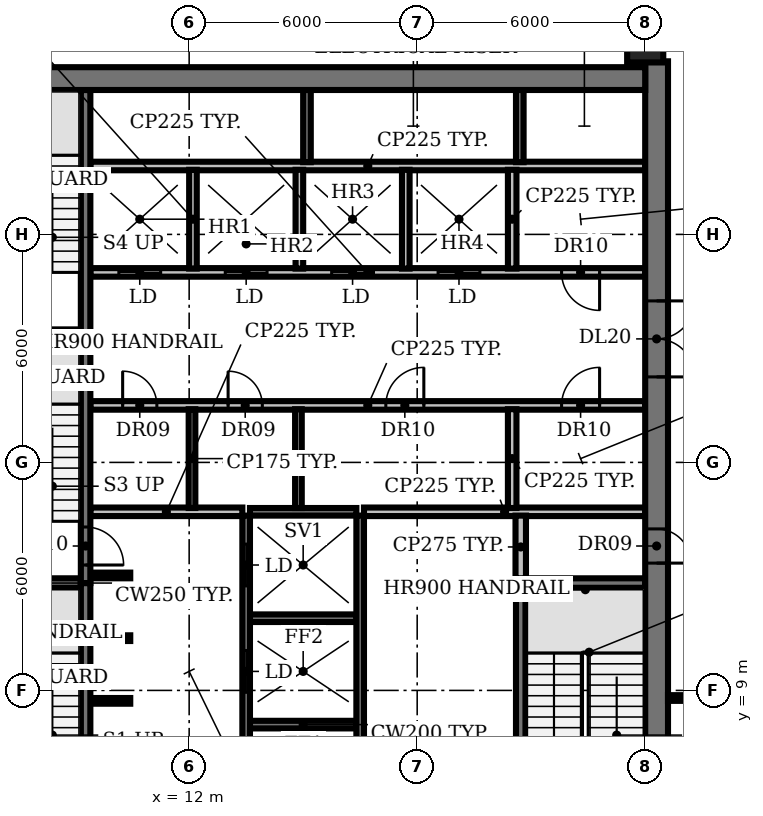
"""IFC4 building model, lengths in metres.
Left out: names, types, materials, properties, quantities, classifications, styles, units other than length and angle.
Written with IfcOpenShell. Run it as: python <this file> out.ifc"""

import sys

from ifc_helpers import new_model, si_unit, direction, frame, frame_2d, origin, origin_2d, place, context, subcontext, project, spatial, rectangle, circle, extrude, element, fill, save


model = new_model("IFC4")
c1 = context("Model", 3, precision=1e-05, world=origin(), true_north=direction((0.0, 1.0)))
c2 = subcontext(c1, "Body", "Model", "MODEL_VIEW")
j1 = project(units=[si_unit("LENGTHUNIT", "METRE"), si_unit("PLANEANGLEUNIT", "RADIAN")], contexts=[c1])
p1 = place(None, origin())
s1 = spatial("IfcSite", under=j1, at=p1, CompositionType="ELEMENT")
p2 = place(p1, origin())
s2 = spatial("IfcBuilding", under=s1, at=p2, CompositionType="ELEMENT")
p3 = place(p2, frame((0.0, 0.0, 155.0)))
s3 = spatial("IfcBuildingStorey", under=s2, at=p3, CompositionType="ELEMENT", Elevation=155.0)
p4 = place(p3, frame((24.0, 26.0, 0.0), z_axis=(0.0, 0.0, 1.0), x_axis=(1.0, 0.0, 0.0)))
e1 = element("IfcColumn", 1, at=p4, inside=s3, PredefinedType="COLUMN", context=c2, shape_type="SweptSolid", body=[
    extrude(circle(Radius=0.475, at=origin_2d()), origin(), (0.0, 0.0, 1.0), 3.85),
])
p5 = place(p3, frame((13.6, 8.1, 0.0), z_axis=(0.0, 0.0, 1.0), x_axis=(1.0, 0.0, 0.0)))
e2 = element("IfcWall", 2, at=p5, inside=s3, PredefinedType="SHEAR", context=c2, shape_type="SweptSolid", body=[
    extrude(rectangle(XDim=2.8, YDim=0.2, at=frame_2d((1.4, 0.0))), origin(), (0.0, 0.0, 1.0), 3.85),
])
for number, where, z_axis, x_axis in (
    (3, (9.4, 8.725, 0.0), (0.0, 0.0, 1.0), (1.0, 0.0, 0.0)),
    (4, (9.4, 10.375, 0.0), (0.0, 0.0, 1.0), (1.0, 0.0, 0.0)),
):
    element("IfcWall", number, at=place(p3, frame(where, z_axis=z_axis, x_axis=x_axis)), inside=s3, PredefinedType="SHEAR", context=c2, shape_type="SweptSolid", body=[
        extrude(rectangle(XDim=1.05, YDim=0.15, at=frame_2d((0.525, 0.0))), origin(), (0.0, 0.0, 1.0), 3.85),
    ])
p6 = place(p3, frame((13.6, 10.9, 0.0), z_axis=(0.0, 0.0, 1.0), x_axis=(1.0, 0.0, 0.0)))
e5 = element("IfcWall", 5, at=p6, inside=s3, PredefinedType="SHEAR", context=c2, shape_type="SweptSolid", body=[
    extrude(rectangle(XDim=2.8, YDim=0.2, at=frame_2d((1.4, 0.0))), origin(), (0.0, 0.0, 1.0), 3.85),
])
for number, where, z_axis, x_axis in (
    (6, (6.0, 11.825, 0.0), (0.0, 0.0, 1.0), (1.0, 0.0, 0.0)),
    (7, (20.85, 11.825, 0.0), (0.0, 0.0, 1.0), (1.0, 0.0, 0.0)),
):
    element("IfcWall", number, at=place(p3, frame(where, z_axis=z_axis, x_axis=x_axis)), inside=s3, PredefinedType="SHEAR", context=c2, shape_type="SweptSolid", body=[
        extrude(rectangle(XDim=3.15, YDim=0.25, at=frame_2d((1.575, 0.0))), origin(), (0.0, 0.0, 1.0), 3.85),
    ])
p7 = place(p3, frame((9.4, 12.025, 0.0), z_axis=(0.0, 0.0, 1.0), x_axis=(1.0, 0.0, 0.0)))
e8 = element("IfcWall", 8, at=p7, inside=s3, PredefinedType="SHEAR", context=c2, shape_type="SweptSolid", body=[
    extrude(rectangle(XDim=1.05, YDim=0.15, at=frame_2d((0.525, 0.0))), origin(), (0.0, 0.0, 1.0), 3.85),
])
p8 = place(p3, frame((9.4, 13.7, 0.0), z_axis=(0.0, 0.0, 1.0), x_axis=(1.0, 0.0, 0.0)))
e9 = element("IfcWall", 9, at=p8, inside=s3, PredefinedType="PARTITIONING", context=c2, shape_type="SweptSolid", body=[
    extrude(rectangle(XDim=4.0, YDim=0.225, at=frame_2d((2.0, 0.0))), origin(), (0.0, 0.0, 1.0), 3.85),
])
p9 = place(p3, frame((13.6, 13.7, 0.0), z_axis=(0.0, 0.0, 1.0), x_axis=(1.0, 0.0, 0.0)))
e10 = element("IfcWall", 10, at=p9, inside=s3, PredefinedType="SHEAR", context=c2, shape_type="SweptSolid", body=[
    extrude(rectangle(XDim=2.8, YDim=0.2, at=frame_2d((1.4, 0.0))), origin(), (0.0, 0.0, 1.0), 3.85),
])
p10 = place(p3, frame((16.6, 13.7, 0.0), z_axis=(0.0, 0.0, 1.0), x_axis=(1.0, 0.0, 0.0)))
e11 = element("IfcWall", 11, at=p10, inside=s3, PredefinedType="PARTITIONING", context=c2, shape_type="SweptSolid", body=[
    extrude(rectangle(XDim=7.4, YDim=0.225, at=frame_2d((3.7, 0.0))), origin(), (0.0, 0.0, 1.0), 3.85),
])
p11 = place(p3, frame((9.4, 16.5, 0.0), z_axis=(0.0, 0.0, 1.0), x_axis=(1.0, 0.0, 0.0)))
e12 = element("IfcWall", 12, at=p11, inside=s3, PredefinedType="PARTITIONING", context=c2, shape_type="SweptSolid", body=[
    extrude(rectangle(XDim=14.6, YDim=0.225, at=frame_2d((7.3, 0.0))), origin(), (0.0, 0.0, 1.0), 3.85),
])
p12 = place(p11, frame((0.85, 0.0, 0.0)))
e13 = element("IfcOpeningElement", 13, at=p12, cuts=e12, PredefinedType="OPENING", context=c2, shape_type="SweptSolid", body=[
    extrude(rectangle(XDim=0.9, YDim=2.1, at=frame_2d((0.45, 1.05))), frame((0.0, 0.123, 0.0), z_axis=(0.0, -1.0, 0.0), x_axis=(1.0, 0.0, 0.0)), (0.0, 0.0, 1.0), 0.245),
])
p13 = place(p11, frame((3.625, 0.0, 0.0)))
e14 = element("IfcOpeningElement", 14, at=p13, cuts=e12, PredefinedType="OPENING", context=c2, shape_type="SweptSolid", body=[
    extrude(rectangle(XDim=0.9, YDim=2.1, at=frame_2d((0.45, 1.05))), frame((0.0, 0.123, 0.0), z_axis=(0.0, -1.0, 0.0), x_axis=(1.0, 0.0, 0.0)), (0.0, 0.0, 1.0), 0.245),
])
p14 = place(p11, frame((7.775, 0.0, 0.0)))
e15 = element("IfcOpeningElement", 15, at=p14, cuts=e12, PredefinedType="OPENING", context=c2, shape_type="SweptSolid", body=[
    extrude(rectangle(XDim=1.0, YDim=2.1, at=frame_2d((0.5, 1.05))), frame((0.0, 0.123, 0.0), z_axis=(0.0, -1.0, 0.0), x_axis=(1.0, 0.0, 0.0)), (0.0, 0.0, 1.0), 0.245),
])
p15 = place(p11, frame((12.4, 0.0, 0.0)))
e16 = element("IfcOpeningElement", 16, at=p15, cuts=e12, PredefinedType="OPENING", context=c2, shape_type="SweptSolid", body=[
    extrude(rectangle(XDim=1.0, YDim=2.1, at=frame_2d((0.5, 1.05))), frame((0.0, 0.123, 0.0), z_axis=(0.0, -1.0, 0.0), x_axis=(1.0, 0.0, 0.0)), (0.0, 0.0, 1.0), 0.245),
])
p16 = place(p3, frame((6.0, 18.375, 0.0), z_axis=(0.0, 0.0, 1.0), x_axis=(1.0, 0.0, 0.0)))
e17 = element("IfcWall", 17, at=p16, inside=s3, PredefinedType="SHEAR", context=c2, shape_type="SweptSolid", body=[
    extrude(rectangle(XDim=3.15, YDim=0.25, at=frame_2d((1.575, 0.0))), origin(), (0.0, 0.0, 1.0), 3.85),
])
p17 = place(p3, frame((24.0, 20.0, 0.0), z_axis=(0.0, 0.0, 1.0), x_axis=(-1.0, 0.0, 0.0)))
e18 = element("IfcWall", 18, at=p17, inside=s3, PredefinedType="PARTITIONING", context=c2, shape_type="SweptSolid", body=[
    extrude(rectangle(XDim=14.6, YDim=0.225, at=frame_2d((7.3, 0.0))), origin(), (0.0, 0.0, 1.0), 3.85),
])
p18 = place(p17, frame((12.75, 0.0, 0.0)))
e19 = element("IfcOpeningElement", 19, at=p18, cuts=e18, PredefinedType="OPENING", context=c2, shape_type="SweptSolid", body=[
    extrude(rectangle(XDim=1.1, YDim=2.1, at=frame_2d((0.55, 1.05))), frame((0.0, 0.123, 0.0), z_axis=(0.0, -1.0, 0.0), x_axis=(1.0, 0.0, 0.0)), (0.0, 0.0, 1.0), 0.245),
])
p19 = place(p17, frame((9.95, 0.0, 0.0)))
e20 = element("IfcOpeningElement", 20, at=p19, cuts=e18, PredefinedType="OPENING", context=c2, shape_type="SweptSolid", body=[
    extrude(rectangle(XDim=1.1, YDim=2.1, at=frame_2d((0.55, 1.05))), frame((0.0, 0.123, 0.0), z_axis=(0.0, -1.0, 0.0), x_axis=(1.0, 0.0, 0.0)), (0.0, 0.0, 1.0), 0.245),
])
p20 = place(p17, frame((7.15, 0.0, 0.0)))
e21 = element("IfcOpeningElement", 21, at=p20, cuts=e18, PredefinedType="OPENING", context=c2, shape_type="SweptSolid", body=[
    extrude(rectangle(XDim=1.1, YDim=2.1, at=frame_2d((0.55, 1.05))), frame((0.0, 0.123, 0.0), z_axis=(0.0, -1.0, 0.0), x_axis=(1.0, 0.0, 0.0)), (0.0, 0.0, 1.0), 0.245),
])
p21 = place(p17, frame((4.35, 0.0, 0.0)))
e22 = element("IfcOpeningElement", 22, at=p21, cuts=e18, PredefinedType="OPENING", context=c2, shape_type="SweptSolid", body=[
    extrude(rectangle(XDim=1.1, YDim=2.1, at=frame_2d((0.55, 1.05))), frame((0.0, 0.123, 0.0), z_axis=(0.0, -1.0, 0.0), x_axis=(1.0, 0.0, 0.0)), (0.0, 0.0, 1.0), 0.245),
])
p22 = place(p17, frame((1.2, 0.0, 0.0)))
e23 = element("IfcOpeningElement", 23, at=p22, cuts=e18, PredefinedType="OPENING", context=c2, shape_type="SweptSolid", body=[
    extrude(rectangle(XDim=1.0, YDim=2.1, at=frame_2d((0.5, 1.05))), frame((0.0, 0.123, 0.0), z_axis=(0.0, -1.0, 0.0), x_axis=(1.0, 0.0, 0.0)), (0.0, 0.0, 1.0), 0.245),
])
p23 = place(p3, frame((9.4, 22.8, 0.0), z_axis=(0.0, 0.0, 1.0), x_axis=(1.0, 0.0, 0.0)))
e24 = element("IfcWall", 24, at=p23, inside=s3, PredefinedType="PARTITIONING", context=c2, shape_type="SweptSolid", body=[
    extrude(rectangle(XDim=14.6, YDim=0.225, at=frame_2d((7.3, 0.0))), origin(), (0.0, 0.0, 1.0), 3.85),
])
p24 = place(p3, frame((9.275, 11.825, 0.0), z_axis=(0.0, 0.0, 1.0), x_axis=(0.0, -1.0, 0.0)))
e25 = element("IfcWall", 25, at=p24, inside=s3, PredefinedType="SHEAR", context=c2, shape_type="SweptSolid", body=[
    extrude(rectangle(XDim=6.425, YDim=0.25, at=frame_2d((3.212, 0.0))), origin(), (0.0, 0.0, 1.0), 3.85),
])
p25 = place(p24, frame((5.075, 0.0, 0.0)))
e26 = element("IfcOpeningElement", 26, at=p25, cuts=e25, PredefinedType="OPENING", context=c2, shape_type="SweptSolid", body=[
    extrude(rectangle(XDim=1.0, YDim=2.1, at=frame_2d((0.5, 1.05))), frame((0.0, 0.135, 0.0), z_axis=(0.0, -1.0, 0.0), x_axis=(1.0, 0.0, 0.0)), (0.0, 0.0, 1.0), 0.27),
])
p26 = place(p3, frame((9.275, 18.375, 0.0), z_axis=(0.0, 0.0, 1.0), x_axis=(0.0, -1.0, 0.0)))
e27 = element("IfcWall", 27, at=p26, inside=s3, PredefinedType="SHEAR", context=c2, shape_type="SweptSolid", body=[
    extrude(rectangle(XDim=6.55, YDim=0.25, at=frame_2d((3.275, 0.0))), origin(), (0.0, 0.0, 1.0), 3.85),
])
p27 = place(p26, frame((5.075, 0.0, 0.0)))
e28 = element("IfcOpeningElement", 28, at=p27, cuts=e27, PredefinedType="OPENING", context=c2, shape_type="SweptSolid", body=[
    extrude(rectangle(XDim=1.0, YDim=2.1, at=frame_2d((0.5, 1.05))), frame((0.0, 0.135, 0.0), z_axis=(0.0, -1.0, 0.0), x_axis=(1.0, 0.0, 0.0)), (0.0, 0.0, 1.0), 0.27),
])
p28 = place(p3, frame((9.275, 18.375, 0.0), z_axis=(0.0, 0.0, 1.0), x_axis=(0.0, 1.0, 0.0)))
e29 = element("IfcWall", 29, at=p28, inside=s3, PredefinedType="SHEAR", context=c2, shape_type="SweptSolid", body=[
    extrude(rectangle(XDim=6.425, YDim=0.25, at=frame_2d((3.212, 0.0))), origin(), (0.0, 0.0, 1.0), 3.85),
])
p29 = place(p3, frame((12.075, 13.8, 0.0), z_axis=(0.0, 0.0, 1.0), x_axis=(0.0, 1.0, 0.0)))
e30 = element("IfcWall", 30, at=p29, inside=s3, PredefinedType="PARTITIONING", context=c2, shape_type="SweptSolid", body=[
    extrude(rectangle(XDim=2.6, YDim=0.175, at=frame_2d((1.3, 0.0))), origin(), (0.0, 0.0, 1.0), 3.85),
])
p30 = place(p3, frame((12.1, 20.1, 0.0), z_axis=(0.0, 0.0, 1.0), x_axis=(0.0, 1.0, 0.0)))
e31 = element("IfcWall", 31, at=p30, inside=s3, PredefinedType="SOLIDWALL", context=c2, shape_type="SweptSolid", body=[
    extrude(rectangle(XDim=2.6, YDim=0.2, at=frame_2d((1.3, 0.0))), origin(), (0.0, 0.0, 1.0), 3.85),
])
p31 = place(p3, frame((13.5, 5.4, 0.0), z_axis=(0.0, 0.0, 1.0), x_axis=(0.0, 1.0, 0.0)))
e32 = element("IfcWall", 32, at=p31, inside=s3, PredefinedType="SHEAR", context=c2, shape_type="SweptSolid", body=[
    extrude(rectangle(XDim=8.2, YDim=0.2, at=frame_2d((4.1, 0.0))), origin(), (0.0, 0.0, 1.0), 3.85),
])
p32 = place(p31, frame((0.75, 0.0, 0.0)))
e33 = element("IfcOpeningElement", 33, at=p32, cuts=e32, PredefinedType="OPENING", context=c2, shape_type="SweptSolid", body=[
    extrude(rectangle(XDim=1.1, YDim=2.1, at=frame_2d((0.55, 1.05))), frame((0.0, 0.11, 0.0), z_axis=(0.0, -1.0, 0.0), x_axis=(1.0, 0.0, 0.0)), (0.0, 0.0, 1.0), 0.22),
])
p33 = place(p31, frame((3.55, 0.0, 0.0)))
e34 = element("IfcOpeningElement", 34, at=p33, cuts=e32, PredefinedType="OPENING", context=c2, shape_type="SweptSolid", body=[
    extrude(rectangle(XDim=1.1, YDim=2.1, at=frame_2d((0.55, 1.05))), frame((0.0, 0.11, 0.0), z_axis=(0.0, -1.0, 0.0), x_axis=(1.0, 0.0, 0.0)), (0.0, 0.0, 1.0), 0.22),
])
p34 = place(p31, frame((6.35, 0.0, 0.0)))
e35 = element("IfcOpeningElement", 35, at=p34, cuts=e32, PredefinedType="OPENING", context=c2, shape_type="SweptSolid", body=[
    extrude(rectangle(XDim=1.1, YDim=2.1, at=frame_2d((0.55, 1.05))), frame((0.0, 0.11, 0.0), z_axis=(0.0, -1.0, 0.0), x_axis=(1.0, 0.0, 0.0)), (0.0, 0.0, 1.0), 0.22),
])
p35 = place(p3, frame((14.875, 13.8, 0.0), z_axis=(0.0, 0.0, 1.0), x_axis=(0.0, 1.0, 0.0)))
e36 = element("IfcWall", 36, at=p35, inside=s3, PredefinedType="PARTITIONING", context=c2, shape_type="SweptSolid", body=[
    extrude(rectangle(XDim=2.6, YDim=0.175, at=frame_2d((1.3, 0.0))), origin(), (0.0, 0.0, 1.0), 3.85),
])
p36 = place(p3, frame((14.9, 20.1, 0.0), z_axis=(0.0, 0.0, 1.0), x_axis=(0.0, 1.0, 0.0)))
e37 = element("IfcWall", 37, at=p36, inside=s3, PredefinedType="SOLIDWALL", context=c2, shape_type="SweptSolid", body=[
    extrude(rectangle(XDim=2.6, YDim=0.2, at=frame_2d((1.3, 0.0))), origin(), (0.0, 0.0, 1.0), 3.85),
])
p37 = place(p3, frame((15.1, 22.9, 0.0), z_axis=(0.0, 0.0, 1.0), x_axis=(0.0, 1.0, 0.0)))
e38 = element("IfcWall", 38, at=p37, inside=s3, PredefinedType="SHEAR", context=c2, shape_type="SweptSolid", body=[
    extrude(rectangle(XDim=1.9, YDim=0.2, at=frame_2d((0.95, 0.0))), origin(), (0.0, 0.0, 1.0), 3.85),
])
p38 = place(p3, frame((16.5, 5.4, 0.0), z_axis=(0.0, 0.0, 1.0), x_axis=(0.0, 1.0, 0.0)))
e39 = element("IfcWall", 39, at=p38, inside=s3, PredefinedType="SHEAR", context=c2, shape_type="SweptSolid", body=[
    extrude(rectangle(XDim=8.2, YDim=0.2, at=frame_2d((4.1, 0.0))), origin(), (0.0, 0.0, 1.0), 3.85),
])
p39 = place(p3, frame((17.7, 20.1, 0.0), z_axis=(0.0, 0.0, 1.0), x_axis=(0.0, 1.0, 0.0)))
e40 = element("IfcWall", 40, at=p39, inside=s3, PredefinedType="SOLIDWALL", context=c2, shape_type="SweptSolid", body=[
    extrude(rectangle(XDim=2.6, YDim=0.2, at=frame_2d((1.3, 0.0))), origin(), (0.0, 0.0, 1.0), 3.85),
])
for number, where, z_axis, x_axis in (
    (41, (20.5, 13.8, 0.0), (0.0, 0.0, 1.0), (0.0, 1.0, 0.0)),
    (42, (20.5, 20.1, 0.0), (0.0, 0.0, 1.0), (0.0, 1.0, 0.0)),
):
    element("IfcWall", number, at=place(p3, frame(where, z_axis=z_axis, x_axis=x_axis)), inside=s3, PredefinedType="PARTITIONING", context=c2, shape_type="SweptSolid", body=[
        extrude(rectangle(XDim=2.6, YDim=0.225, at=frame_2d((1.3, 0.0))), origin(), (0.0, 0.0, 1.0), 3.85),
    ])
p40 = place(p3, frame((20.7, 22.9, 0.0), z_axis=(0.0, 0.0, 1.0), x_axis=(0.0, 1.0, 0.0)))
e43 = element("IfcWall", 43, at=p40, inside=s3, PredefinedType="SHEAR", context=c2, shape_type="SweptSolid", body=[
    extrude(rectangle(XDim=1.9, YDim=0.2, at=frame_2d((0.95, 0.0))), origin(), (0.0, 0.0, 1.0), 3.85),
])
p41 = place(p3, frame((20.725, 5.4, 0.0), z_axis=(0.0, 0.0, 1.0), x_axis=(0.0, 1.0, 0.0)))
e44 = element("IfcWall", 44, at=p41, inside=s3, PredefinedType="SHEAR", context=c2, shape_type="SweptSolid", body=[
    extrude(rectangle(XDim=6.3, YDim=0.25, at=frame_2d((3.15, 0.0))), origin(), (0.0, 0.0, 1.0), 3.85),
])
p42 = place(p3, frame((20.725, 11.95, 0.0), z_axis=(0.0, 0.0, 1.0), x_axis=(0.0, 1.0, 0.0)))
e45 = element("IfcWall", 45, at=p42, inside=s3, PredefinedType="PARTITIONING", context=c2, shape_type="SweptSolid", body=[
    extrude(rectangle(XDim=1.65, YDim=0.275, at=frame_2d((0.825, 0.0))), origin(), (0.0, 0.0, 1.0), 3.85),
])
p43 = place(p3, frame((24.3, 25.555, 0.0), z_axis=(0.0, 0.0, 1.0), x_axis=(0.0, -1.0, 0.0)))
e46 = element("IfcWall", 46, at=p43, inside=s3, PredefinedType="SHEAR", context=c2, shape_type="SweptSolid", body=[
    extrude(rectangle(XDim=20.755, YDim=0.6, at=frame_2d((10.377, 0.0))), origin(), (0.0, 0.0, 1.0), 3.85),
])
p44 = place(p43, frame((18.405, 0.0, 0.0)))
e47 = element("IfcOpeningElement", 47, at=p44, cuts=e46, PredefinedType="OPENING", context=c2, shape_type="SweptSolid", body=[
    extrude(rectangle(XDim=1.5, YDim=2.1, at=frame_2d((0.75, 1.05))), frame((0.0, 0.31, 0.0), z_axis=(0.0, -1.0, 0.0), x_axis=(1.0, 0.0, 0.0)), (0.0, 0.0, 1.0), 0.62),
])
p45 = place(p43, frame((12.305, 0.0, 0.0)))
e48 = element("IfcOpeningElement", 48, at=p45, cuts=e46, PredefinedType="OPENING", context=c2, shape_type="SweptSolid", body=[
    extrude(rectangle(XDim=0.9, YDim=2.1, at=frame_2d((0.45, 1.05))), frame((0.0, 0.31, 0.0), z_axis=(0.0, -1.0, 0.0), x_axis=(1.0, 0.0, 0.0)), (0.0, 0.0, 1.0), 0.62),
])
p46 = place(p43, frame((6.305, 0.0, 0.0)))
e49 = element("IfcOpeningElement", 49, at=p46, cuts=e46, PredefinedType="OPENING", context=c2, shape_type="SweptSolid", body=[
    extrude(rectangle(XDim=2.0, YDim=2.1, at=frame_2d((1.0, 1.05))), frame((0.0, 0.31, 0.0), z_axis=(0.0, -1.0, 0.0), x_axis=(1.0, 0.0, 0.0)), (0.0, 0.0, 1.0), 0.62),
])
p47 = place(p3, frame((6.0, 25.1, 0.0), z_axis=(0.0, 0.0, 1.0), x_axis=(1.0, 0.0, 0.0)))
e50 = element("IfcWall", 50, at=p47, inside=s3, PredefinedType="SHEAR", context=c2, shape_type="SweptSolid", body=[
    extrude(rectangle(XDim=18.0, YDim=0.6, at=frame_2d((9.0, 0.0))), origin(), (0.0, 0.0, 1.0), 3.85),
])
p48 = place(p3, frame((24.6, 8.8, 0.0), z_axis=(0.0, 0.0, 1.0), x_axis=(1.0, 0.0, 0.0)))
e51 = element("IfcWall", 51, at=p48, inside=s3, PredefinedType="PARTITIONING", context=c2, shape_type="SweptSolid", body=[
    extrude(rectangle(XDim=1.05, YDim=0.15, at=frame_2d((0.525, 0.0))), origin(), (0.0, 0.0, 1.0), 2.88),
])
p49 = place(p12, origin())
e52 = element("IfcDoor", 52, at=p49, inside=s3, OperationType="SINGLE_SWING_LEFT", PredefinedType="DOOR", context=c2, shape_type="SweptSolid", body=[
    extrude(rectangle(XDim=0.9, YDim=2.1, at=frame_2d((0.45, 1.05))), frame((0.0, 0.025, 0.0), z_axis=(0.0, -1.0, 0.0), x_axis=(1.0, 0.0, 0.0)), (0.0, 0.0, 1.0), 0.05),
])
fill(e13, e52)
p50 = place(p13, origin())
e53 = element("IfcDoor", 53, at=p50, inside=s3, OperationType="SINGLE_SWING_LEFT", PredefinedType="DOOR", context=c2, shape_type="SweptSolid", body=[
    extrude(rectangle(XDim=0.9, YDim=2.1, at=frame_2d((0.45, 1.05))), frame((0.0, 0.025, 0.0), z_axis=(0.0, -1.0, 0.0), x_axis=(1.0, 0.0, 0.0)), (0.0, 0.0, 1.0), 0.05),
])
fill(e14, e53)
p51 = place(p14, origin())
e54 = element("IfcDoor", 54, at=p51, inside=s3, OperationType="SINGLE_SWING_RIGHT", PredefinedType="DOOR", context=c2, shape_type="SweptSolid", body=[
    extrude(rectangle(XDim=1.0, YDim=2.1, at=frame_2d((0.5, 1.05))), frame((0.0, 0.025, 0.0), z_axis=(0.0, -1.0, 0.0), x_axis=(1.0, 0.0, 0.0)), (0.0, 0.0, 1.0), 0.05),
])
fill(e15, e54)
p52 = place(p15, origin())
e55 = element("IfcDoor", 55, at=p52, inside=s3, OperationType="SINGLE_SWING_RIGHT", PredefinedType="DOOR", context=c2, shape_type="SweptSolid", body=[
    extrude(rectangle(XDim=1.0, YDim=2.1, at=frame_2d((0.5, 1.05))), frame((0.0, 0.025, 0.0), z_axis=(0.0, -1.0, 0.0), x_axis=(1.0, 0.0, 0.0)), (0.0, 0.0, 1.0), 0.05),
])
fill(e16, e55)
p53 = place(p18, origin())
e56 = element("IfcDoor", 56, at=p53, inside=s3, OperationType="DOUBLE_DOOR_SLIDING", PredefinedType="DOOR", context=c2, shape_type="SweptSolid", body=[
    extrude(rectangle(XDim=1.1, YDim=2.1, at=frame_2d((0.55, 1.05))), frame((0.0, 0.025, 0.0), z_axis=(0.0, -1.0, 0.0), x_axis=(1.0, 0.0, 0.0)), (0.0, 0.0, 1.0), 0.05),
])
fill(e19, e56)
p54 = place(p19, origin())
e57 = element("IfcDoor", 57, at=p54, inside=s3, OperationType="DOUBLE_DOOR_SLIDING", PredefinedType="DOOR", context=c2, shape_type="SweptSolid", body=[
    extrude(rectangle(XDim=1.1, YDim=2.1, at=frame_2d((0.55, 1.05))), frame((0.0, 0.025, 0.0), z_axis=(0.0, -1.0, 0.0), x_axis=(1.0, 0.0, 0.0)), (0.0, 0.0, 1.0), 0.05),
])
fill(e20, e57)
p55 = place(p20, origin())
e58 = element("IfcDoor", 58, at=p55, inside=s3, OperationType="DOUBLE_DOOR_SLIDING", PredefinedType="DOOR", context=c2, shape_type="SweptSolid", body=[
    extrude(rectangle(XDim=1.1, YDim=2.1, at=frame_2d((0.55, 1.05))), frame((0.0, 0.025, 0.0), z_axis=(0.0, -1.0, 0.0), x_axis=(1.0, 0.0, 0.0)), (0.0, 0.0, 1.0), 0.05),
])
fill(e21, e58)
p56 = place(p21, origin())
e59 = element("IfcDoor", 59, at=p56, inside=s3, OperationType="DOUBLE_DOOR_SLIDING", PredefinedType="DOOR", context=c2, shape_type="SweptSolid", body=[
    extrude(rectangle(XDim=1.1, YDim=2.1, at=frame_2d((0.55, 1.05))), frame((0.0, 0.025, 0.0), z_axis=(0.0, -1.0, 0.0), x_axis=(1.0, 0.0, 0.0)), (0.0, 0.0, 1.0), 0.05),
])
fill(e22, e59)
p57 = place(p22, origin())
e60 = element("IfcDoor", 60, at=p57, inside=s3, OperationType="SINGLE_SWING_LEFT", PredefinedType="DOOR", context=c2, shape_type="SweptSolid", body=[
    extrude(rectangle(XDim=1.0, YDim=2.1, at=frame_2d((0.5, 1.05))), frame((0.0, 0.025, 0.0), z_axis=(0.0, -1.0, 0.0), x_axis=(1.0, 0.0, 0.0)), (0.0, 0.0, 1.0), 0.05),
])
fill(e23, e60)
p58 = place(p27, origin())
e61 = element("IfcDoor", 61, at=p58, inside=s3, OperationType="SINGLE_SWING_RIGHT", PredefinedType="DOOR", context=c2, shape_type="SweptSolid", body=[
    extrude(rectangle(XDim=1.0, YDim=2.1, at=frame_2d((0.5, 1.05))), frame((0.0, 0.025, 0.0), z_axis=(0.0, -1.0, 0.0), x_axis=(1.0, 0.0, 0.0)), (0.0, 0.0, 1.0), 0.05),
])
fill(e28, e61)
p59 = place(p33, origin())
e62 = element("IfcDoor", 62, at=p59, inside=s3, OperationType="DOUBLE_DOOR_SLIDING", PredefinedType="DOOR", context=c2, shape_type="SweptSolid", body=[
    extrude(rectangle(XDim=1.1, YDim=2.1, at=frame_2d((0.55, 1.05))), frame((0.0, 0.025, 0.0), z_axis=(0.0, -1.0, 0.0), x_axis=(1.0, 0.0, 0.0)), (0.0, 0.0, 1.0), 0.05),
])
fill(e34, e62)
p60 = place(p34, origin())
e63 = element("IfcDoor", 63, at=p60, inside=s3, OperationType="DOUBLE_DOOR_SLIDING", PredefinedType="DOOR", context=c2, shape_type="SweptSolid", body=[
    extrude(rectangle(XDim=1.1, YDim=2.1, at=frame_2d((0.55, 1.05))), frame((0.0, 0.025, 0.0), z_axis=(0.0, -1.0, 0.0), x_axis=(1.0, 0.0, 0.0)), (0.0, 0.0, 1.0), 0.05),
])
fill(e35, e63)
p61 = place(p45, origin())
e64 = element("IfcDoor", 64, at=p61, inside=s3, OperationType="SINGLE_SWING_RIGHT", PredefinedType="DOOR", context=c2, shape_type="SweptSolid", body=[
    extrude(rectangle(XDim=0.9, YDim=2.1, at=frame_2d((0.45, 1.05))), frame((0.0, -0.24, 0.0), z_axis=(0.0, -1.0, 0.0), x_axis=(1.0, 0.0, 0.0)), (0.0, 0.0, 1.0), 0.05),
])
fill(e48, e64)
p62 = place(p46, origin())
e65 = element("IfcDoor", 65, at=p62, inside=s3, OperationType="DOUBLE_DOOR_SINGLE_SWING", PredefinedType="DOOR", context=c2, shape_type="SweptSolid", body=[
    extrude(rectangle(XDim=2.0, YDim=2.1, at=frame_2d((1.0, 1.05))), frame((0.0, 0.025, 0.0), z_axis=(0.0, -1.0, 0.0), x_axis=(1.0, 0.0, 0.0)), (0.0, 0.0, 1.0), 0.05),
])
fill(e49, e65)
save(model, sys.argv[1])
